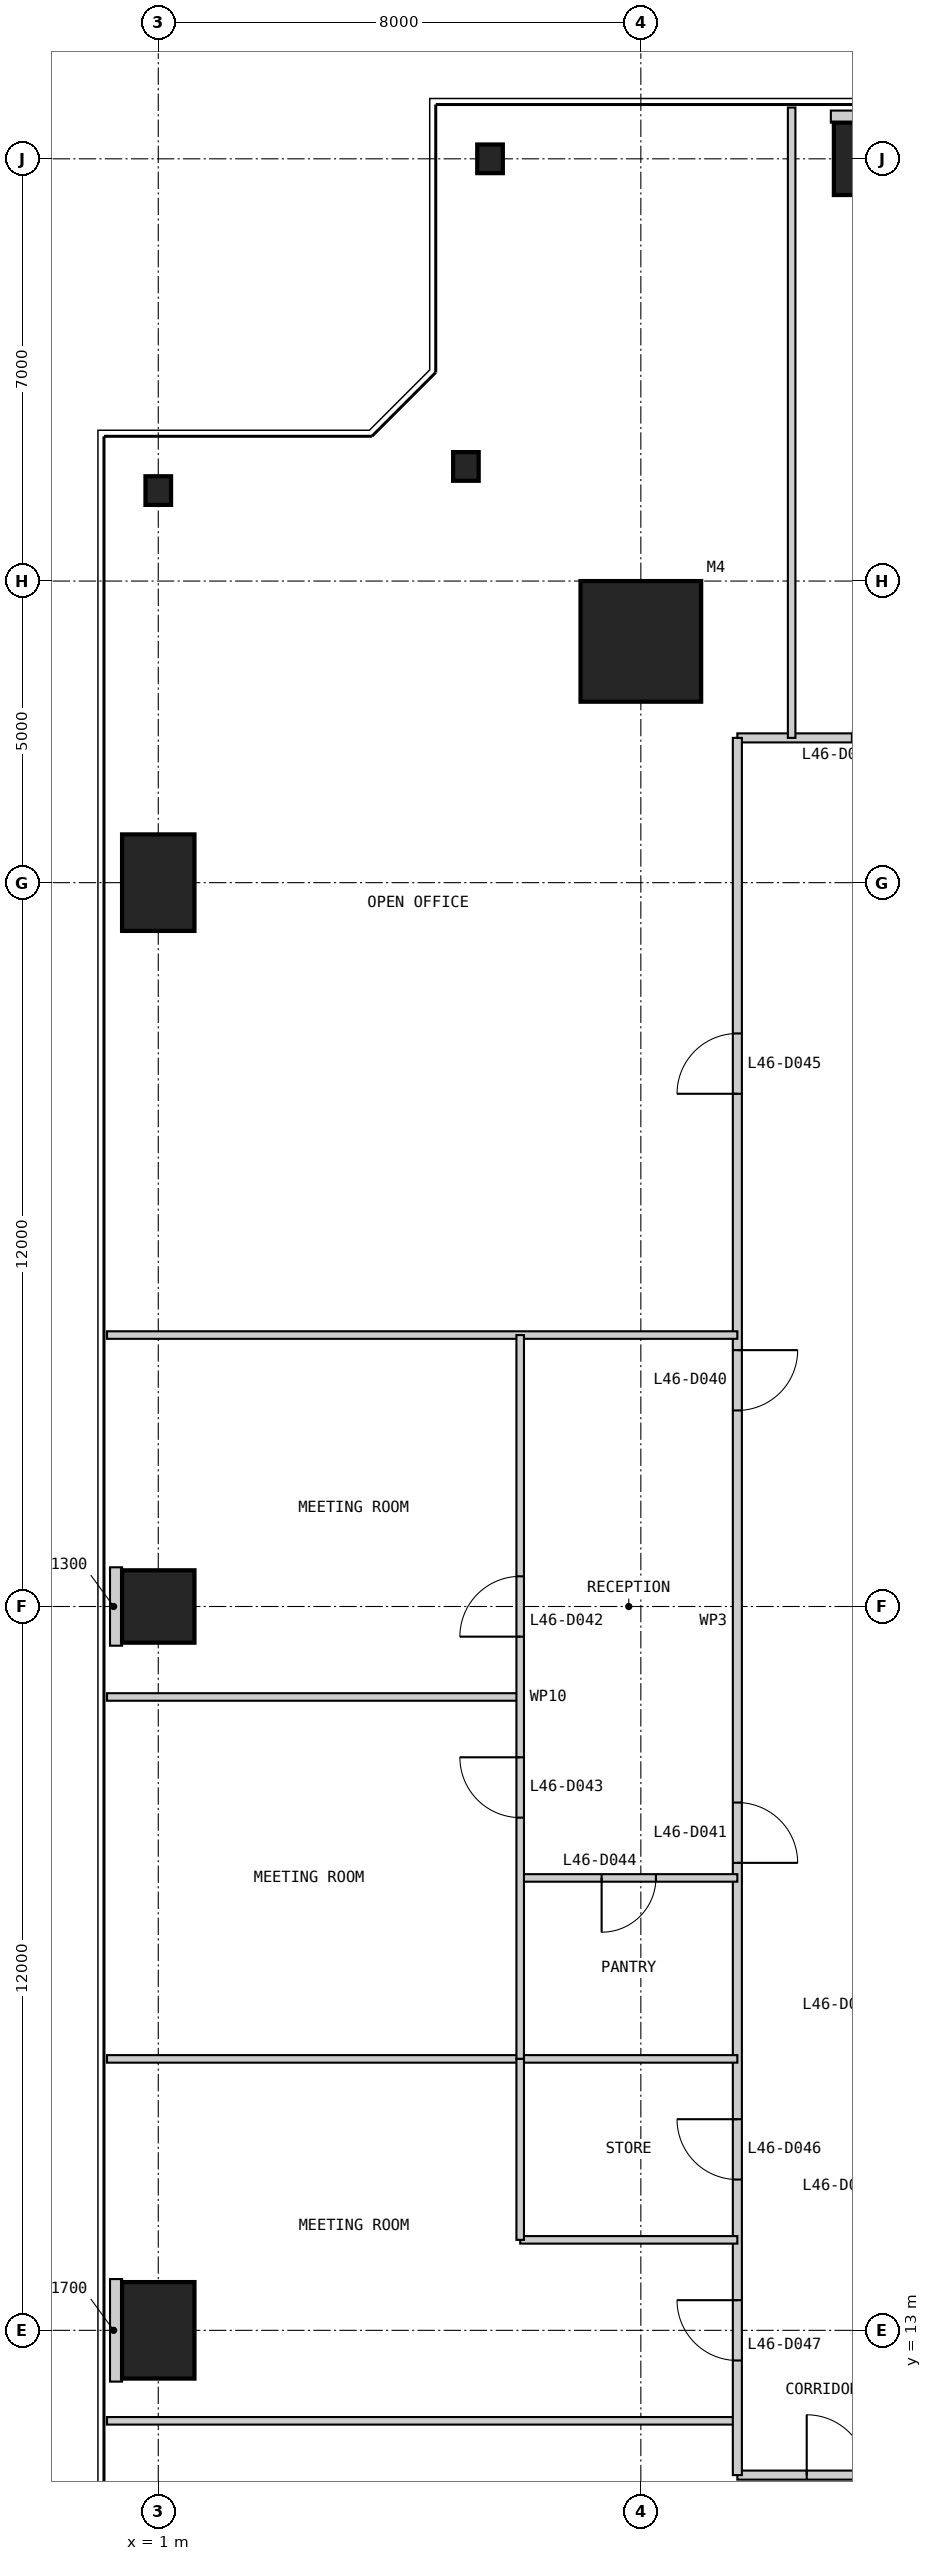
"""IFC4 building model, lengths in metres.
Left out: names, types, materials, properties, quantities, classifications, styles, units other than length and angle.
Written with IfcOpenShell. Run it as: python <this file> out.ifc"""

import sys

from ifc_helpers import new_model, si_unit, direction, frame, frame_2d, origin, origin_2d, place, context, subcontext, project, spatial, rectangle, i_section, extrude, element, fill, save


model = new_model("IFC4")
c1 = context("Model", 3, precision=1e-05, world=origin(), true_north=direction((0.0, 1.0)))
c2 = subcontext(c1, "Body", "Model", "MODEL_VIEW")
j1 = project(units=[si_unit("LENGTHUNIT", "METRE"), si_unit("PLANEANGLEUNIT", "RADIAN")], contexts=[c1])
p1 = place(None, origin())
s1 = spatial("IfcSite", under=j1, at=p1, CompositionType="ELEMENT")
p2 = place(p1, origin())
s2 = spatial("IfcBuilding", under=s1, at=p2, CompositionType="ELEMENT")
p3 = place(p2, frame((0.0, 0.0, 197.8)))
s3 = spatial("IfcBuildingStorey", under=s2, at=p3, CompositionType="ELEMENT", Elevation=197.8)
p4 = place(p3, frame((9.0, 41.0, 0.0), z_axis=(0.0, 0.0, 1.0), x_axis=(1.0, 0.0, 0.0)))
e1 = element("IfcColumn", 1, at=p4, inside=s3, PredefinedType="COLUMN", context=c2, shape_type="SweptSolid", body=[
    extrude(rectangle(XDim=2.0, YDim=2.0, at=origin_2d()), origin(), (0.0, 0.0, 1.0), 4.0),
])
p5 = place(p3, frame((13.0, 49.0, 0.0), z_axis=(0.0, 0.0, 1.0), x_axis=(1.0, 0.0, 0.0)))
e2 = element("IfcColumn", 2, at=p5, inside=s3, PredefinedType="COLUMN", context=c2, shape_type="SweptSolid", body=[
    extrude(rectangle(XDim=1.6, YDim=1.2, at=origin_2d()), origin(), (0.0, 0.0, 1.0), 4.0),
])
for number, where, z_axis, x_axis in (
    (3, (6.5, 49.0, 0.0), (0.0, 0.0, 1.0), (1.0, 0.0, 0.0)),
    (4, (6.1, 43.9, 0.0), (0.0, 0.0, 1.0), (1.0, 0.0, 0.0)),
    (5, (1.0, 43.5, 0.0), (0.0, 0.0, 1.0), (1.0, 0.0, 0.0)),
):
    element("IfcColumn", number, at=place(p3, frame(where, z_axis=z_axis, x_axis=x_axis)), inside=s3, PredefinedType="COLUMN", context=c2, shape_type="SweptSolid", body=[
        extrude(i_section(OverallWidth=0.424, OverallDepth=0.475, WebThickness=0.048, FlangeThickness=0.077, at=origin_2d()), origin(), (0.0, 0.0, 1.0), 4.0),
    ])
p6 = place(p3, frame((1.0, 37.0, 0.0), z_axis=(0.0, 0.0, 1.0), x_axis=(1.0, 0.0, 0.0)))
e6 = element("IfcColumn", 6, at=p6, inside=s3, PredefinedType="COLUMN", context=c2, shape_type="SweptSolid", body=[
    extrude(rectangle(XDim=1.2, YDim=1.6, at=origin_2d()), origin(), (0.0, 0.0, 1.0), 4.0),
])
p7 = place(p3, frame((1.0, 25.0, 0.0), z_axis=(0.0, 0.0, 1.0), x_axis=(1.0, 0.0, 0.0)))
e7 = element("IfcColumn", 7, at=p7, inside=s3, PredefinedType="COLUMN", context=c2, shape_type="SweptSolid", body=[
    extrude(rectangle(XDim=1.2, YDim=1.2, at=origin_2d()), origin(), (0.0, 0.0, 1.0), 4.0),
])
p8 = place(p3, frame((1.0, 13.0, 0.0), z_axis=(0.0, 0.0, 1.0), x_axis=(1.0, 0.0, 0.0)))
e8 = element("IfcColumn", 8, at=p8, inside=s3, PredefinedType="COLUMN", context=c2, shape_type="SweptSolid", body=[
    extrude(rectangle(XDim=1.2, YDim=1.6, at=origin_2d()), origin(), (0.0, 0.0, 1.0), 4.0),
])
p9 = place(p3, frame((10.6, 10.6, 0.0), z_axis=(0.0, 0.0, 1.0), x_axis=(1.0, 0.0, 0.0)))
e9 = element("IfcWall", 9, at=p9, inside=s3, PredefinedType="PARTITIONING", context=c2, shape_type="SweptSolid", body=[
    extrude(rectangle(XDim=27.9, YDim=0.15, at=frame_2d((13.95, 0.0))), origin(), (0.0, 0.0, 1.0), 3.85),
])
p10 = place(p9, frame((4.15, 0.0, 0.0)))
e10 = element("IfcOpeningElement", 10, at=p10, cuts=e9, PredefinedType="OPENING", context=c2, shape_type="SweptSolid", body=[
    extrude(rectangle(XDim=1.0, YDim=2.2, at=frame_2d((0.5, 1.1))), frame((0.0, 0.085, 0.0), z_axis=(0.0, -1.0, 0.0), x_axis=(1.0, 0.0, 0.0)), (0.0, 0.0, 1.0), 0.17),
])
p11 = place(p9, frame((23.65, 0.0, 0.0)))
e11 = element("IfcOpeningElement", 11, at=p11, cuts=e9, PredefinedType="OPENING", context=c2, shape_type="SweptSolid", body=[
    extrude(rectangle(XDim=1.0, YDim=2.2, at=frame_2d((0.5, 1.1))), frame((0.0, 0.085, 0.0), z_axis=(0.0, -1.0, 0.0), x_axis=(1.0, 0.0, 0.0)), (0.0, 0.0, 1.0), 0.17),
])
p12 = place(p9, frame((1.15, 0.0, 0.0)))
e12 = element("IfcOpeningElement", 12, at=p12, cuts=e9, PredefinedType="OPENING", context=c2, shape_type="SweptSolid", body=[
    extrude(rectangle(XDim=1.0, YDim=2.2, at=frame_2d((0.5, 1.1))), frame((0.0, 0.085, 0.0), z_axis=(0.0, -1.0, 0.0), x_axis=(1.0, 0.0, 0.0)), (0.0, 0.0, 1.0), 0.17),
])
p13 = place(p3, frame((0.15, 11.5, 0.0), z_axis=(0.0, 0.0, 1.0), x_axis=(1.0, 0.0, 0.0)))
e13 = element("IfcWall", 13, at=p13, inside=s3, PredefinedType="PARTITIONING", context=c2, shape_type="SweptSolid", body=[
    extrude(rectangle(XDim=10.45, YDim=0.125, at=frame_2d((5.225, 0.0))), origin(), (0.0, 0.0, 1.0), 3.85),
])
p14 = place(p3, frame((38.5, 39.4, 0.0), z_axis=(0.0, 0.0, 1.0), x_axis=(-1.0, 0.0, 0.0)))
e14 = element("IfcWall", 14, at=p14, inside=s3, PredefinedType="PARTITIONING", context=c2, shape_type="SweptSolid", body=[
    extrude(rectangle(XDim=27.9, YDim=0.15, at=frame_2d((13.95, 0.0))), origin(), (0.0, 0.0, 1.0), 3.85),
])
p15 = place(p14, frame((9.25, 0.0, 0.0)))
e15 = element("IfcOpeningElement", 15, at=p15, cuts=e14, PredefinedType="OPENING", context=c2, shape_type="SweptSolid", body=[
    extrude(rectangle(XDim=1.0, YDim=2.2, at=frame_2d((0.5, 1.1))), frame((0.0, 0.085, 0.0), z_axis=(0.0, -1.0, 0.0), x_axis=(1.0, 0.0, 0.0)), (0.0, 0.0, 1.0), 0.17),
])
p16 = place(p14, frame((16.75, 0.0, 0.0)))
e16 = element("IfcOpeningElement", 16, at=p16, cuts=e14, PredefinedType="OPENING", context=c2, shape_type="SweptSolid", body=[
    extrude(rectangle(XDim=1.0, YDim=2.2, at=frame_2d((0.5, 1.1))), frame((0.0, 0.085, 0.0), z_axis=(0.0, -1.0, 0.0), x_axis=(1.0, 0.0, 0.0)), (0.0, 0.0, 1.0), 0.17),
])
p17 = place(p14, frame((4.0, 0.0, 0.0)))
e17 = element("IfcOpeningElement", 17, at=p17, cuts=e14, PredefinedType="OPENING", context=c2, shape_type="SweptSolid", body=[
    extrude(rectangle(XDim=1.0, YDim=2.2, at=frame_2d((0.5, 1.1))), frame((0.0, 0.085, 0.0), z_axis=(0.0, -1.0, 0.0), x_axis=(1.0, 0.0, 0.0)), (0.0, 0.0, 1.0), 0.17),
])
p18 = place(p14, frame((22.0, 0.0, 0.0)))
e18 = element("IfcOpeningElement", 18, at=p18, cuts=e14, PredefinedType="OPENING", context=c2, shape_type="SweptSolid", body=[
    extrude(rectangle(XDim=1.0, YDim=2.2, at=frame_2d((0.5, 1.1))), frame((0.0, 0.085, 0.0), z_axis=(0.0, -1.0, 0.0), x_axis=(1.0, 0.0, 0.0)), (0.0, 0.0, 1.0), 0.17),
])
p19 = place(p14, frame((25.0, 0.0, 0.0)))
e19 = element("IfcOpeningElement", 19, at=p19, cuts=e14, PredefinedType="OPENING", context=c2, shape_type="SweptSolid", body=[
    extrude(rectangle(XDim=1.0, YDim=2.2, at=frame_2d((0.5, 1.1))), frame((0.0, 0.085, 0.0), z_axis=(0.0, -1.0, 0.0), x_axis=(1.0, 0.0, 0.0)), (0.0, 0.0, 1.0), 0.17),
])
p20 = place(p3, frame((10.6, 39.4, 0.0), z_axis=(0.0, 0.0, 1.0), x_axis=(0.0, -1.0, 0.0)))
e20 = element("IfcWall", 20, at=p20, inside=s3, PredefinedType="PARTITIONING", context=c2, shape_type="SweptSolid", body=[
    extrude(rectangle(XDim=28.8, YDim=0.15, at=frame_2d((14.4, 0.0))), origin(), (0.0, 0.0, 1.0), 3.85),
])
p21 = place(p20, frame((10.15, 0.0, 0.0)))
e21 = element("IfcOpeningElement", 21, at=p21, cuts=e20, PredefinedType="OPENING", context=c2, shape_type="SweptSolid", body=[
    extrude(rectangle(XDim=1.0, YDim=2.2, at=frame_2d((0.5, 1.1))), frame((0.0, 0.085, 0.0), z_axis=(0.0, -1.0, 0.0), x_axis=(1.0, 0.0, 0.0)), (0.0, 0.0, 1.0), 0.17),
])
p22 = place(p20, frame((17.65, 0.0, 0.0)))
e22 = element("IfcOpeningElement", 22, at=p22, cuts=e20, PredefinedType="OPENING", context=c2, shape_type="SweptSolid", body=[
    extrude(rectangle(XDim=1.0, YDim=2.2, at=frame_2d((0.5, 1.1))), frame((0.0, 0.085, 0.0), z_axis=(0.0, -1.0, 0.0), x_axis=(1.0, 0.0, 0.0)), (0.0, 0.0, 1.0), 0.17),
])
p23 = place(p20, frame((4.9, 0.0, 0.0)))
e23 = element("IfcOpeningElement", 23, at=p23, cuts=e20, PredefinedType="OPENING", context=c2, shape_type="SweptSolid", body=[
    extrude(rectangle(XDim=1.0, YDim=2.2, at=frame_2d((0.5, 1.1))), frame((0.0, 0.085, 0.0), z_axis=(0.0, -1.0, 0.0), x_axis=(1.0, 0.0, 0.0)), (0.0, 0.0, 1.0), 0.17),
])
p24 = place(p20, frame((22.9, 0.0, 0.0)))
e24 = element("IfcOpeningElement", 24, at=p24, cuts=e20, PredefinedType="OPENING", context=c2, shape_type="SweptSolid", body=[
    extrude(rectangle(XDim=1.0, YDim=2.2, at=frame_2d((0.5, 1.1))), frame((0.0, 0.085, 0.0), z_axis=(0.0, -1.0, 0.0), x_axis=(1.0, 0.0, 0.0)), (0.0, 0.0, 1.0), 0.17),
])
p25 = place(p20, frame((25.9, 0.0, 0.0)))
e25 = element("IfcOpeningElement", 25, at=p25, cuts=e20, PredefinedType="OPENING", context=c2, shape_type="SweptSolid", body=[
    extrude(rectangle(XDim=1.0, YDim=2.2, at=frame_2d((0.5, 1.1))), frame((0.0, 0.085, 0.0), z_axis=(0.0, -1.0, 0.0), x_axis=(1.0, 0.0, 0.0)), (0.0, 0.0, 1.0), 0.17),
])
for number, where, z_axis, x_axis in (
    (26, (11.5, 49.85, 0.0), (0.0, 0.0, 1.0), (0.0, -1.0, 0.0)),
    (27, (0.15, 29.5, 0.0), (0.0, 0.0, 1.0), (1.0, 0.0, 0.0)),
):
    element("IfcWall", number, at=place(p3, frame(where, z_axis=z_axis, x_axis=x_axis)), inside=s3, PredefinedType="PARTITIONING", context=c2, shape_type="SweptSolid", body=[
        extrude(rectangle(XDim=10.45, YDim=0.125, at=frame_2d((5.225, 0.0))), origin(), (0.0, 0.0, 1.0), 3.85),
    ])
p26 = place(p3, frame((0.15, 23.5, 0.0), z_axis=(0.0, 0.0, 1.0), x_axis=(1.0, 0.0, 0.0)))
e28 = element("IfcWall", 28, at=p26, inside=s3, PredefinedType="PARTITIONING", context=c2, shape_type="SweptSolid", body=[
    extrude(rectangle(XDim=6.85, YDim=0.125, at=frame_2d((3.425, 0.0))), origin(), (0.0, 0.0, 1.0), 3.85),
])
p27 = place(p3, frame((7.0, 20.5, 0.0), z_axis=(0.0, 0.0, 1.0), x_axis=(1.0, 0.0, 0.0)))
e29 = element("IfcWall", 29, at=p27, inside=s3, PredefinedType="PARTITIONING", context=c2, shape_type="SweptSolid", body=[
    extrude(rectangle(XDim=3.6, YDim=0.125, at=frame_2d((1.8, 0.0))), origin(), (0.0, 0.0, 1.0), 3.85),
])
p28 = place(p27, frame((1.35, 0.0, 0.0)))
e30 = element("IfcOpeningElement", 30, at=p28, cuts=e29, PredefinedType="OPENING", context=c2, shape_type="SweptSolid", body=[
    extrude(rectangle(XDim=0.9, YDim=2.2, at=frame_2d((0.45, 1.1))), frame((0.0, 0.073, 0.0), z_axis=(0.0, -1.0, 0.0), x_axis=(1.0, 0.0, 0.0)), (0.0, 0.0, 1.0), 0.145),
])
p29 = place(p3, frame((0.15, 17.5, 0.0), z_axis=(0.0, 0.0, 1.0), x_axis=(1.0, 0.0, 0.0)))
e31 = element("IfcWall", 31, at=p29, inside=s3, PredefinedType="PARTITIONING", context=c2, shape_type="SweptSolid", body=[
    extrude(rectangle(XDim=10.45, YDim=0.125, at=frame_2d((5.225, 0.0))), origin(), (0.0, 0.0, 1.0), 3.85),
])
p30 = place(p3, frame((7.0, 14.5, 0.0), z_axis=(0.0, 0.0, 1.0), x_axis=(1.0, 0.0, 0.0)))
e32 = element("IfcWall", 32, at=p30, inside=s3, PredefinedType="PARTITIONING", context=c2, shape_type="SweptSolid", body=[
    extrude(rectangle(XDim=3.6, YDim=0.125, at=frame_2d((1.8, 0.0))), origin(), (0.0, 0.0, 1.0), 3.85),
])
p31 = place(p3, frame((7.0, 29.5, 0.0), z_axis=(0.0, 0.0, 1.0), x_axis=(0.0, -1.0, 0.0)))
e33 = element("IfcWall", 33, at=p31, inside=s3, PredefinedType="PARTITIONING", context=c2, shape_type="SweptSolid", body=[
    extrude(rectangle(XDim=12.0, YDim=0.125, at=frame_2d((6.0, 0.0))), origin(), (0.0, 0.0, 1.0), 3.238),
])
p32 = place(p31, frame((4.0, 0.0, 0.0)))
e34 = element("IfcOpeningElement", 34, at=p32, cuts=e33, PredefinedType="OPENING", context=c2, shape_type="SweptSolid", body=[
    extrude(rectangle(XDim=1.0, YDim=2.2, at=frame_2d((0.5, 1.1))), frame((0.0, 0.073, 0.0), z_axis=(0.0, -1.0, 0.0), x_axis=(1.0, 0.0, 0.0)), (0.0, 0.0, 1.0), 0.145),
])
p33 = place(p31, frame((7.0, 0.0, 0.0)))
e35 = element("IfcOpeningElement", 35, at=p33, cuts=e33, PredefinedType="OPENING", context=c2, shape_type="SweptSolid", body=[
    extrude(rectangle(XDim=1.0, YDim=2.2, at=frame_2d((0.5, 1.1))), frame((0.0, 0.073, 0.0), z_axis=(0.0, -1.0, 0.0), x_axis=(1.0, 0.0, 0.0)), (0.0, 0.0, 1.0), 0.145),
])
p34 = place(p3, frame((7.0, 17.5, 0.0), z_axis=(0.0, 0.0, 1.0), x_axis=(0.0, -1.0, 0.0)))
e36 = element("IfcWall", 36, at=p34, inside=s3, PredefinedType="PARTITIONING", context=c2, shape_type="SweptSolid", body=[
    extrude(rectangle(XDim=3.0, YDim=0.125, at=frame_2d((1.5, 0.0))), origin(), (0.0, 0.0, 1.0), 3.238),
])
p35 = place(p3, frame((13.0, 49.8, 0.0), z_axis=(0.0, 0.0, 1.0), x_axis=(0.0, -1.0, 0.0)))
e37 = element("IfcWall", 37, at=p35, inside=s3, PredefinedType="PARTITIONING", context=c2, shape_type="SweptSolid", body=[
    extrude(rectangle(XDim=0.2, YDim=1.7, at=frame_2d((0.1, 0.0))), origin(), (0.0, 0.0, 1.0), 3.85),
])
p36 = place(p3, frame((0.2, 25.0, 0.0), z_axis=(0.0, 0.0, 1.0), x_axis=(1.0, 0.0, 0.0)))
e38 = element("IfcWall", 38, at=p36, inside=s3, PredefinedType="PARTITIONING", context=c2, shape_type="SweptSolid", body=[
    extrude(rectangle(XDim=0.2, YDim=1.3, at=frame_2d((0.1, 0.0))), origin(), (0.0, 0.0, 1.0), 3.85),
])
p37 = place(p3, frame((0.2, 13.0, 0.0), z_axis=(0.0, 0.0, 1.0), x_axis=(1.0, 0.0, 0.0)))
e39 = element("IfcWall", 39, at=p37, inside=s3, PredefinedType="PARTITIONING", context=c2, shape_type="SweptSolid", body=[
    extrude(rectangle(XDim=0.2, YDim=1.7, at=frame_2d((0.1, 0.0))), origin(), (0.0, 0.0, 1.0), 3.85),
])
p38 = place(p12, origin())
e40 = element("IfcDoor", 40, at=p38, inside=s3, OperationType="SINGLE_SWING_LEFT", PredefinedType="DOOR", context=c2, shape_type="SweptSolid", body=[
    extrude(rectangle(XDim=1.0, YDim=2.2, at=frame_2d((0.5, 1.1))), frame((0.0, 0.025, 0.0), z_axis=(0.0, -1.0, 0.0), x_axis=(1.0, 0.0, 0.0)), (0.0, 0.0, 1.0), 0.05),
])
fill(e12, e40)
p39 = place(p21, origin())
e41 = element("IfcDoor", 41, at=p39, inside=s3, OperationType="SINGLE_SWING_LEFT", PredefinedType="DOOR", context=c2, shape_type="SweptSolid", body=[
    extrude(rectangle(XDim=1.0, YDim=2.2, at=frame_2d((0.5, 1.1))), frame((0.0, 0.025, 0.0), z_axis=(0.0, -1.0, 0.0), x_axis=(1.0, 0.0, 0.0)), (0.0, 0.0, 1.0), 0.05),
])
fill(e21, e41)
p40 = place(p22, origin())
e42 = element("IfcDoor", 42, at=p40, inside=s3, OperationType="SINGLE_SWING_RIGHT", PredefinedType="DOOR", context=c2, shape_type="SweptSolid", body=[
    extrude(rectangle(XDim=1.0, YDim=2.2, at=frame_2d((0.5, 1.1))), frame((0.0, 0.025, 0.0), z_axis=(0.0, -1.0, 0.0), x_axis=(1.0, 0.0, 0.0)), (0.0, 0.0, 1.0), 0.05),
])
fill(e22, e42)
p41 = place(p32, frame((1.0, 0.0, 0.0), z_axis=(0.0, 0.0, 1.0), x_axis=(-1.0, 0.0, 0.0)))
e43 = element("IfcDoor", 43, at=p41, inside=s3, OperationType="SINGLE_SWING_LEFT", PredefinedType="DOOR", context=c2, shape_type="SweptSolid", body=[
    extrude(rectangle(XDim=1.0, YDim=2.2, at=frame_2d((0.5, 1.1))), frame((0.0, 0.025, 0.0), z_axis=(0.0, -1.0, 0.0), x_axis=(1.0, 0.0, 0.0)), (0.0, 0.0, 1.0), 0.05),
])
fill(e34, e43)
p42 = place(p33, frame((1.0, 0.0, 0.0), z_axis=(0.0, 0.0, 1.0), x_axis=(-1.0, 0.0, 0.0)))
e44 = element("IfcDoor", 44, at=p42, inside=s3, OperationType="SINGLE_SWING_RIGHT", PredefinedType="DOOR", context=c2, shape_type="SweptSolid", body=[
    extrude(rectangle(XDim=1.0, YDim=2.2, at=frame_2d((0.5, 1.1))), frame((0.0, 0.025, 0.0), z_axis=(0.0, -1.0, 0.0), x_axis=(1.0, 0.0, 0.0)), (0.0, 0.0, 1.0), 0.05),
])
fill(e35, e44)
p43 = place(p28, frame((0.9, 0.0, 0.0), z_axis=(0.0, 0.0, 1.0), x_axis=(-1.0, 0.0, 0.0)))
e45 = element("IfcDoor", 45, at=p43, inside=s3, OperationType="SINGLE_SWING_RIGHT", PredefinedType="DOOR", context=c2, shape_type="SweptSolid", body=[
    extrude(rectangle(XDim=0.9, YDim=2.2, at=frame_2d((0.45, 1.1))), frame((0.0, 0.025, 0.0), z_axis=(0.0, -1.0, 0.0), x_axis=(1.0, 0.0, 0.0)), (0.0, 0.0, 1.0), 0.05),
])
fill(e30, e45)
p44 = place(p23, frame((1.0, 0.0, 0.0), z_axis=(0.0, 0.0, 1.0), x_axis=(-1.0, 0.0, 0.0)))
e46 = element("IfcDoor", 46, at=p44, inside=s3, OperationType="SINGLE_SWING_LEFT", PredefinedType="DOOR", context=c2, shape_type="SweptSolid", body=[
    extrude(rectangle(XDim=1.0, YDim=2.2, at=frame_2d((0.5, 1.1))), frame((0.0, 0.025, 0.0), z_axis=(0.0, -1.0, 0.0), x_axis=(1.0, 0.0, 0.0)), (0.0, 0.0, 1.0), 0.05),
])
fill(e23, e46)
p45 = place(p24, frame((1.0, 0.0, 0.0), z_axis=(0.0, 0.0, 1.0), x_axis=(-1.0, 0.0, 0.0)))
e47 = element("IfcDoor", 47, at=p45, inside=s3, OperationType="SINGLE_SWING_RIGHT", PredefinedType="DOOR", context=c2, shape_type="SweptSolid", body=[
    extrude(rectangle(XDim=1.0, YDim=2.2, at=frame_2d((0.5, 1.1))), frame((0.0, 0.025, 0.0), z_axis=(0.0, -1.0, 0.0), x_axis=(1.0, 0.0, 0.0)), (0.0, 0.0, 1.0), 0.05),
])
fill(e24, e47)
p46 = place(p25, frame((1.0, 0.0, 0.0), z_axis=(0.0, 0.0, 1.0), x_axis=(-1.0, 0.0, 0.0)))
e48 = element("IfcDoor", 48, at=p46, inside=s3, OperationType="SINGLE_SWING_RIGHT", PredefinedType="DOOR", context=c2, shape_type="SweptSolid", body=[
    extrude(rectangle(XDim=1.0, YDim=2.2, at=frame_2d((0.5, 1.1))), frame((0.0, 0.025, 0.0), z_axis=(0.0, -1.0, 0.0), x_axis=(1.0, 0.0, 0.0)), (0.0, 0.0, 1.0), 0.05),
])
fill(e25, e48)
save(model, sys.argv[1])
